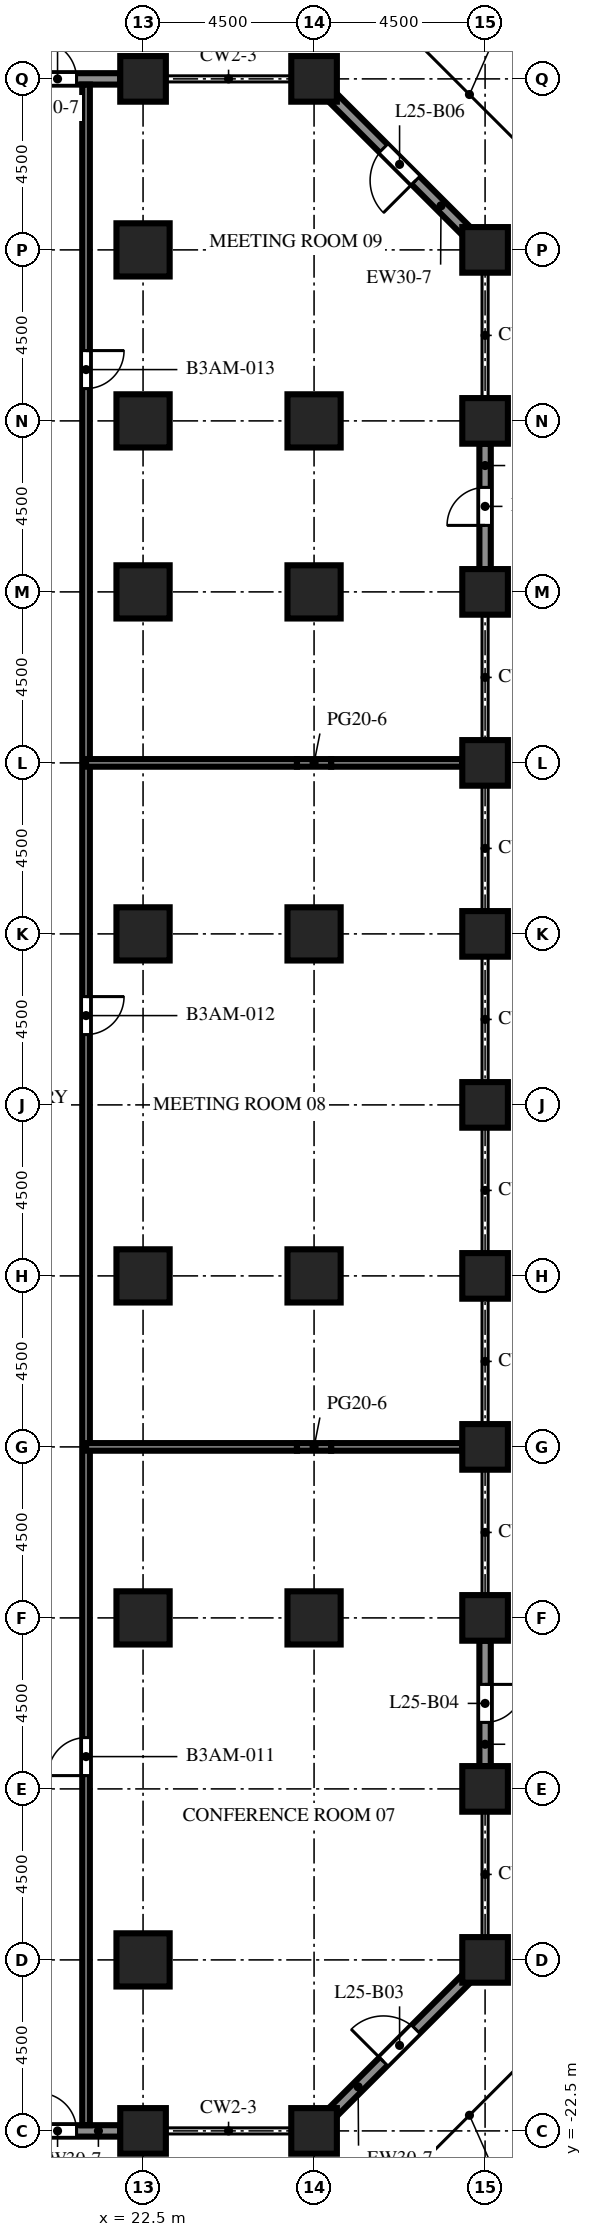
"""IFC4 building model, lengths in metres.
Left out: names, types, materials, properties, quantities, classifications, styles, units other than length and angle.
Written with IfcOpenShell. Run it as: python <this file> out.ifc"""

import sys

from ifc_helpers import new_model, si_unit, direction, frame, frame_2d, origin, origin_2d, place, context, subcontext, project, spatial, rectangle, extrude, element, fill, save


model = new_model("IFC4")
c1 = context("Model", 3, precision=1e-05, world=origin(), true_north=direction((0.0, 1.0)))
c2 = subcontext(c1, "Body", "Model", "MODEL_VIEW")
j1 = project(units=[si_unit("LENGTHUNIT", "METRE"), si_unit("PLANEANGLEUNIT", "RADIAN")], contexts=[c1])
p1 = place(None, origin())
s1 = spatial("IfcSite", under=j1, at=p1, CompositionType="ELEMENT")
p2 = place(p1, origin())
s2 = spatial("IfcBuilding", under=s1, at=p2, CompositionType="ELEMENT")
p3 = place(p2, frame((0.0, 0.0, 110.7)))
s3 = spatial("IfcBuildingStorey", under=s2, at=p3, CompositionType="ELEMENT", Elevation=110.7)
for number, where, z_axis, x_axis in (
    (1, (22.5, -22.5, 0.0), (0.0, 0.0, 1.0), (1.0, 0.0, 0.0)),
    (2, (22.5, 31.5, 0.0), (0.0, 0.0, 1.0), (1.0, 0.0, 0.0)),
):
    element("IfcColumn", number, at=place(p3, frame(where, z_axis=z_axis, x_axis=x_axis)), inside=s3, PredefinedType="COLUMN", context=c2, shape_type="SweptSolid", body=[
        extrude(rectangle(XDim=1.2, YDim=1.2, at=origin_2d()), origin(), (0.0, 0.0, 1.0), 6.0),
    ])
for number, where, z_axis, x_axis in (
    (3, (27.0, -22.5, 0.0), (0.0, 0.0, 1.0), (1.0, 0.0, 0.0)),
    (4, (27.0, 31.5, 0.0), (0.0, 0.0, 1.0), (1.0, 0.0, 0.0)),
):
    element("IfcColumn", number, at=place(p3, frame(where, z_axis=z_axis, x_axis=x_axis)), inside=s3, PredefinedType="COLUMN", context=c2, shape_type="SweptSolid", body=[
        extrude(rectangle(XDim=1.2, YDim=1.2, at=origin_2d()), origin(), (0.0, 0.0, 1.0), 3.75),
    ])
for number, where, z_axis, x_axis in (
    (5, (31.5, -18.0, 0.0), (0.0, 0.0, 1.0), (1.0, 0.0, 0.0)),
    (6, (31.5, -13.5, 0.0), (0.0, 0.0, 1.0), (1.0, 0.0, 0.0)),
    (7, (31.5, -9.0, 0.0), (0.0, 0.0, 1.0), (1.0, 0.0, 0.0)),
    (8, (31.5, -4.5, 0.0), (0.0, 0.0, 1.0), (1.0, 0.0, 0.0)),
    (9, (31.5, 0.0, 0.0), (0.0, 0.0, 1.0), (1.0, 0.0, 0.0)),
    (10, (31.5, 4.5, 0.0), (0.0, 0.0, 1.0), (1.0, 0.0, 0.0)),
    (11, (31.5, 9.0, 0.0), (0.0, 0.0, 1.0), (1.0, 0.0, 0.0)),
    (12, (31.5, 13.5, 0.0), (0.0, 0.0, 1.0), (1.0, 0.0, 0.0)),
    (13, (31.5, 18.0, 0.0), (0.0, 0.0, 1.0), (1.0, 0.0, 0.0)),
    (14, (31.5, 22.5, 0.0), (0.0, 0.0, 1.0), (1.0, 0.0, 0.0)),
    (15, (31.5, 27.0, 0.0), (0.0, 0.0, 1.0), (1.0, 0.0, 0.0)),
):
    element("IfcColumn", number, at=place(p3, frame(where, z_axis=z_axis, x_axis=x_axis)), inside=s3, PredefinedType="COLUMN", context=c2, shape_type="SweptSolid", body=[
        extrude(rectangle(XDim=1.2, YDim=1.2, at=origin_2d()), origin(), (0.0, 0.0, 1.0), 6.0),
    ])
for number, where, z_axis, x_axis in (
    (16, (22.5, -18.0, 0.0), (0.0, 0.0, 1.0), (1.0, 0.0, 0.0)),
    (17, (22.5, -9.0, 0.0), (0.0, 0.0, 1.0), (1.0, 0.0, 0.0)),
    (18, (22.5, 0.0, 0.0), (0.0, 0.0, 1.0), (1.0, 0.0, 0.0)),
    (19, (22.5, 9.0, 0.0), (0.0, 0.0, 1.0), (1.0, 0.0, 0.0)),
    (20, (22.5, 18.0, 0.0), (0.0, 0.0, 1.0), (1.0, 0.0, 0.0)),
    (21, (22.5, 22.5, 0.0), (0.0, 0.0, 1.0), (1.0, 0.0, 0.0)),
    (22, (22.5, 27.0, 0.0), (0.0, 0.0, 1.0), (1.0, 0.0, 0.0)),
):
    element("IfcColumn", number, at=place(p3, frame(where, z_axis=z_axis, x_axis=x_axis)), inside=s3, PredefinedType="COLUMN", context=c2, shape_type="SweptSolid", body=[
        extrude(rectangle(XDim=1.4, YDim=1.4, at=origin_2d()), origin(), (0.0, 0.0, 1.0), 6.0),
    ])
for number, where, z_axis, x_axis in (
    (23, (27.0, -9.0, 0.0), (0.0, 0.0, 1.0), (1.0, 0.0, 0.0)),
    (24, (27.0, 0.0, 0.0), (0.0, 0.0, 1.0), (1.0, 0.0, 0.0)),
    (25, (27.0, 9.0, 0.0), (0.0, 0.0, 1.0), (1.0, 0.0, 0.0)),
    (26, (27.0, 18.0, 0.0), (0.0, 0.0, 1.0), (1.0, 0.0, 0.0)),
    (27, (27.0, 22.5, 0.0), (0.0, 0.0, 1.0), (1.0, 0.0, 0.0)),
):
    element("IfcColumn", number, at=place(p3, frame(where, z_axis=z_axis, x_axis=x_axis)), inside=s3, PredefinedType="COLUMN", context=c2, shape_type="SweptSolid", body=[
        extrude(rectangle(XDim=1.4, YDim=1.4, at=origin_2d()), origin(), (0.0, 0.0, 1.0), 5.55),
    ])
p4 = place(p3, frame((21.9, -22.5, 0.0), z_axis=(0.0, 0.0, 1.0), x_axis=(-1.0, 0.0, 0.0)))
e28 = element("IfcWall", 28, at=p4, inside=s3, PredefinedType="SOLIDWALL", context=c2, shape_type="SweptSolid", body=[
    extrude(rectangle(XDim=3.3, YDim=0.3, at=frame_2d((1.65, 0.0))), origin(), (0.0, 0.0, 1.0), 4.65),
])
p5 = place(p4, frame((1.15, 0.0, 0.0)))
e29 = element("IfcOpeningElement", 29, at=p5, cuts=e28, PredefinedType="OPENING", context=c2, shape_type="SweptSolid", body=[
    extrude(rectangle(XDim=1.0, YDim=2.2, at=frame_2d((0.5, 1.1))), frame((0.0, 0.16, 0.0), z_axis=(0.0, -1.0, 0.0), x_axis=(1.0, 0.0, 0.0)), (0.0, 0.0, 1.0), 0.32),
])
p6 = place(p3, frame((31.006, -18.494, 0.0), z_axis=(0.0, 0.0, 1.0), x_axis=(-0.707106781187, -0.707106781187, 0.0)))
e30 = element("IfcWall", 30, at=p6, inside=s3, PredefinedType="SOLIDWALL", context=c2, shape_type="SweptSolid", body=[
    extrude(rectangle(XDim=4.967, YDim=0.3, at=frame_2d((2.483, 0.0))), origin(), (0.0, 0.0, 1.0), 4.65),
])
p7 = place(p6, frame((1.884, 0.0, 0.0)))
e31 = element("IfcOpeningElement", 31, at=p7, cuts=e30, PredefinedType="OPENING", context=c2, shape_type="SweptSolid", body=[
    extrude(rectangle(XDim=1.2, YDim=2.2, at=frame_2d((0.6, 1.1))), frame((0.0, 0.16, 0.0), z_axis=(0.0, -1.0, 0.0), x_axis=(1.0, 0.0, 0.0)), (0.0, 0.0, 1.0), 0.32),
])
p8 = place(p3, frame((31.5, -9.6, 0.0), z_axis=(0.0, 0.0, 1.0), x_axis=(0.0, -1.0, 0.0)))
e32 = element("IfcWall", 32, at=p8, inside=s3, PredefinedType="SOLIDWALL", context=c2, shape_type="SweptSolid", body=[
    extrude(rectangle(XDim=3.3, YDim=0.3, at=frame_2d((1.65, 0.0))), origin(), (0.0, 0.0, 1.0), 4.65),
])
p9 = place(p8, frame((1.15, 0.0, 0.0)))
e33 = element("IfcOpeningElement", 33, at=p9, cuts=e32, PredefinedType="OPENING", context=c2, shape_type="SweptSolid", body=[
    extrude(rectangle(XDim=1.0, YDim=2.2, at=frame_2d((0.5, 1.1))), frame((0.0, 0.16, 0.0), z_axis=(0.0, -1.0, 0.0), x_axis=(1.0, 0.0, 0.0)), (0.0, 0.0, 1.0), 0.32),
])
p10 = place(p3, frame((31.5, 21.9, 0.0), z_axis=(0.0, 0.0, 1.0), x_axis=(0.0, -1.0, 0.0)))
e34 = element("IfcWall", 34, at=p10, inside=s3, PredefinedType="SOLIDWALL", context=c2, shape_type="SweptSolid", body=[
    extrude(rectangle(XDim=3.3, YDim=0.3, at=frame_2d((1.65, 0.0))), origin(), (0.0, 0.0, 1.0), 4.65),
])
p11 = place(p10, frame((1.15, 0.0, 0.0)))
e35 = element("IfcOpeningElement", 35, at=p11, cuts=e34, PredefinedType="OPENING", context=c2, shape_type="SweptSolid", body=[
    extrude(rectangle(XDim=1.0, YDim=2.2, at=frame_2d((0.5, 1.1))), frame((0.0, 0.16, 0.0), z_axis=(0.0, -1.0, 0.0), x_axis=(1.0, 0.0, 0.0)), (0.0, 0.0, 1.0), 0.32),
])
p12 = place(p3, frame((27.494, 31.006, 0.0), z_axis=(0.0, 0.0, 1.0), x_axis=(0.707106781187, -0.707106781187, 0.0)))
e36 = element("IfcWall", 36, at=p12, inside=s3, PredefinedType="SOLIDWALL", context=c2, shape_type="SweptSolid", body=[
    extrude(rectangle(XDim=4.967, YDim=0.3, at=frame_2d((2.483, 0.0))), origin(), (0.0, 0.0, 1.0), 4.65),
])
p13 = place(p12, frame((1.884, 0.0, 0.0)))
e37 = element("IfcOpeningElement", 37, at=p13, cuts=e36, PredefinedType="OPENING", context=c2, shape_type="SweptSolid", body=[
    extrude(rectangle(XDim=1.2, YDim=2.2, at=frame_2d((0.6, 1.1))), frame((0.0, 0.16, 0.0), z_axis=(0.0, -1.0, 0.0), x_axis=(1.0, 0.0, 0.0)), (0.0, 0.0, 1.0), 0.32),
])
p14 = place(p3, frame((18.6, 31.5, 0.0), z_axis=(0.0, 0.0, 1.0), x_axis=(1.0, 0.0, 0.0)))
e38 = element("IfcWall", 38, at=p14, inside=s3, PredefinedType="SOLIDWALL", context=c2, shape_type="SweptSolid", body=[
    extrude(rectangle(XDim=3.3, YDim=0.3, at=frame_2d((1.65, 0.0))), origin(), (0.0, 0.0, 1.0), 4.65),
])
p15 = place(p14, frame((1.15, 0.0, 0.0)))
e39 = element("IfcOpeningElement", 39, at=p15, cuts=e38, PredefinedType="OPENING", context=c2, shape_type="SweptSolid", body=[
    extrude(rectangle(XDim=1.0, YDim=2.2, at=frame_2d((0.5, 1.1))), frame((0.0, 0.16, 0.0), z_axis=(0.0, -1.0, 0.0), x_axis=(1.0, 0.0, 0.0)), (0.0, 0.0, 1.0), 0.32),
])
p16 = place(p3, frame((21.0, 31.35, 0.0), z_axis=(0.0, 0.0, 1.0), x_axis=(0.0, -1.0, 0.0)))
e40 = element("IfcWall", 40, at=p16, inside=s3, PredefinedType="PARTITIONING", context=c2, shape_type="SweptSolid", body=[
    extrude(rectangle(XDim=53.7, YDim=0.2, at=frame_2d((26.85, 0.0))), origin(), (0.0, 0.0, 1.0), 5.55),
])
p17 = place(p16, frame((43.5, 0.0, 0.0)))
e41 = element("IfcOpeningElement", 41, at=p17, cuts=e40, PredefinedType="OPENING", context=c2, shape_type="SweptSolid", body=[
    extrude(rectangle(XDim=1.0, YDim=2.1, at=frame_2d((0.5, 1.05))), frame((0.0, 0.11, 0.0), z_axis=(0.0, -1.0, 0.0), x_axis=(1.0, 0.0, 0.0)), (0.0, 0.0, 1.0), 0.22),
])
p18 = place(p16, frame((24.0, 0.0, 0.0)))
e42 = element("IfcOpeningElement", 42, at=p18, cuts=e40, PredefinedType="OPENING", context=c2, shape_type="SweptSolid", body=[
    extrude(rectangle(XDim=1.0, YDim=2.1, at=frame_2d((0.5, 1.05))), frame((0.0, 0.11, 0.0), z_axis=(0.0, -1.0, 0.0), x_axis=(1.0, 0.0, 0.0)), (0.0, 0.0, 1.0), 0.22),
])
p19 = place(p16, frame((7.0, 0.0, 0.0)))
e43 = element("IfcOpeningElement", 43, at=p19, cuts=e40, PredefinedType="OPENING", context=c2, shape_type="SweptSolid", body=[
    extrude(rectangle(XDim=1.0, YDim=2.1, at=frame_2d((0.5, 1.05))), frame((0.0, 0.11, 0.0), z_axis=(0.0, -1.0, 0.0), x_axis=(1.0, 0.0, 0.0)), (0.0, 0.0, 1.0), 0.22),
])
p20 = place(p3, frame((21.0, -4.5, 0.0), z_axis=(0.0, 0.0, 1.0), x_axis=(1.0, 0.0, 0.0)))
e44 = element("IfcWall", 44, at=p20, inside=s3, PredefinedType="PARTITIONING", context=c2, shape_type="SweptSolid", body=[
    extrude(rectangle(XDim=5.55, YDim=0.2, at=frame_2d((2.775, 0.0))), origin(), (0.0, 0.0, 1.0), 5.55),
])
p21 = place(p3, frame((26.55, -4.5, 0.0), z_axis=(0.0, 0.0, 1.0), x_axis=(1.0, 0.0, 0.0)))
e45 = element("IfcWall", 45, at=p21, inside=s3, PredefinedType="PARTITIONING", context=c2, shape_type="SweptSolid", body=[
    extrude(rectangle(XDim=0.9, YDim=0.2, at=frame_2d((0.45, 0.0))), origin(), (0.0, 0.0, 1.0), 3.72),
])
p22 = place(p3, frame((27.45, -4.5, 0.0), z_axis=(0.0, 0.0, 1.0), x_axis=(1.0, 0.0, 0.0)))
e46 = element("IfcWall", 46, at=p22, inside=s3, PredefinedType="PARTITIONING", context=c2, shape_type="SweptSolid", body=[
    extrude(rectangle(XDim=3.45, YDim=0.2, at=frame_2d((1.725, 0.0))), origin(), (0.0, 0.0, 1.0), 5.55),
])
p23 = place(p3, frame((21.0, 13.5, 0.0), z_axis=(0.0, 0.0, 1.0), x_axis=(1.0, 0.0, 0.0)))
e47 = element("IfcWall", 47, at=p23, inside=s3, PredefinedType="PARTITIONING", context=c2, shape_type="SweptSolid", body=[
    extrude(rectangle(XDim=5.55, YDim=0.2, at=frame_2d((2.775, 0.0))), origin(), (0.0, 0.0, 1.0), 5.55),
])
p24 = place(p3, frame((26.55, 13.5, 0.0), z_axis=(0.0, 0.0, 1.0), x_axis=(1.0, 0.0, 0.0)))
e48 = element("IfcWall", 48, at=p24, inside=s3, PredefinedType="PARTITIONING", context=c2, shape_type="SweptSolid", body=[
    extrude(rectangle(XDim=0.9, YDim=0.2, at=frame_2d((0.45, 0.0))), origin(), (0.0, 0.0, 1.0), 3.72),
])
p25 = place(p3, frame((27.45, 13.5, 0.0), z_axis=(0.0, 0.0, 1.0), x_axis=(1.0, 0.0, 0.0)))
e49 = element("IfcWall", 49, at=p25, inside=s3, PredefinedType="PARTITIONING", context=c2, shape_type="SweptSolid", body=[
    extrude(rectangle(XDim=3.45, YDim=0.2, at=frame_2d((1.725, 0.0))), origin(), (0.0, 0.0, 1.0), 5.55),
])
p26 = place(p5, origin())
e50 = element("IfcDoor", 50, at=p26, inside=s3, OperationType="SINGLE_SWING_RIGHT", PredefinedType="DOOR", context=c2, shape_type="SweptSolid", body=[
    extrude(rectangle(XDim=1.0, YDim=2.2, at=frame_2d((0.5, 1.1))), frame((0.0, 0.025, 0.0), z_axis=(0.0, -1.0, 0.0), x_axis=(1.0, 0.0, 0.0)), (0.0, 0.0, 1.0), 0.05),
])
fill(e29, e50)
p27 = place(p7, origin())
e51 = element("IfcDoor", 51, at=p27, inside=s3, OperationType="SINGLE_SWING_RIGHT", PredefinedType="DOOR", context=c2, shape_type="SweptSolid", body=[
    extrude(rectangle(XDim=1.2, YDim=2.2, at=frame_2d((0.6, 1.1))), frame((0.0, 0.025, 0.0), z_axis=(0.0, -1.0, 0.0), x_axis=(1.0, 0.0, 0.0)), (0.0, 0.0, 1.0), 0.05),
])
fill(e31, e51)
p28 = place(p9, origin())
e52 = element("IfcDoor", 52, at=p28, inside=s3, OperationType="SINGLE_SWING_LEFT", PredefinedType="DOOR", context=c2, shape_type="SweptSolid", body=[
    extrude(rectangle(XDim=1.0, YDim=2.2, at=frame_2d((0.5, 1.1))), frame((0.0, 0.025, 0.0), z_axis=(0.0, -1.0, 0.0), x_axis=(1.0, 0.0, 0.0)), (0.0, 0.0, 1.0), 0.05),
])
fill(e33, e52)
p29 = place(p11, origin())
e53 = element("IfcDoor", 53, at=p29, inside=s3, OperationType="SINGLE_SWING_RIGHT", PredefinedType="DOOR", context=c2, shape_type="SweptSolid", body=[
    extrude(rectangle(XDim=1.0, YDim=2.2, at=frame_2d((0.5, 1.1))), frame((0.0, 0.025, 0.0), z_axis=(0.0, -1.0, 0.0), x_axis=(1.0, 0.0, 0.0)), (0.0, 0.0, 1.0), 0.05),
])
fill(e35, e53)
p30 = place(p13, origin())
e54 = element("IfcDoor", 54, at=p30, inside=s3, OperationType="SINGLE_SWING_RIGHT", PredefinedType="DOOR", context=c2, shape_type="SweptSolid", body=[
    extrude(rectangle(XDim=1.2, YDim=2.2, at=frame_2d((0.6, 1.1))), frame((0.0, 0.025, 0.0), z_axis=(0.0, -1.0, 0.0), x_axis=(1.0, 0.0, 0.0)), (0.0, 0.0, 1.0), 0.05),
])
fill(e37, e54)
p31 = place(p15, origin())
e55 = element("IfcDoor", 55, at=p31, inside=s3, OperationType="SINGLE_SWING_LEFT", PredefinedType="DOOR", context=c2, shape_type="SweptSolid", body=[
    extrude(rectangle(XDim=1.0, YDim=2.2, at=frame_2d((0.5, 1.1))), frame((0.0, 0.025, 0.0), z_axis=(0.0, -1.0, 0.0), x_axis=(1.0, 0.0, 0.0)), (0.0, 0.0, 1.0), 0.05),
])
fill(e39, e55)
p32 = place(p17, origin())
e56 = element("IfcDoor", 56, at=p32, inside=s3, OperationType="SINGLE_SWING_RIGHT", PredefinedType="DOOR", context=c2, shape_type="SweptSolid", body=[
    extrude(rectangle(XDim=1.0, YDim=2.1, at=frame_2d((0.5, 1.05))), frame((0.0, 0.025, 0.0), z_axis=(0.0, -1.0, 0.0), x_axis=(1.0, 0.0, 0.0)), (0.0, 0.0, 1.0), 0.05),
])
fill(e41, e56)
p33 = place(p18, origin())
e57 = element("IfcDoor", 57, at=p33, inside=s3, OperationType="SINGLE_SWING_LEFT", PredefinedType="DOOR", context=c2, shape_type="SweptSolid", body=[
    extrude(rectangle(XDim=1.0, YDim=2.1, at=frame_2d((0.5, 1.05))), frame((0.0, 0.025, 0.0), z_axis=(0.0, -1.0, 0.0), x_axis=(1.0, 0.0, 0.0)), (0.0, 0.0, 1.0), 0.05),
])
fill(e42, e57)
p34 = place(p19, origin())
e58 = element("IfcDoor", 58, at=p34, inside=s3, OperationType="SINGLE_SWING_LEFT", PredefinedType="DOOR", context=c2, shape_type="SweptSolid", body=[
    extrude(rectangle(XDim=1.0, YDim=2.1, at=frame_2d((0.5, 1.05))), frame((0.0, 0.025, 0.0), z_axis=(0.0, -1.0, 0.0), x_axis=(1.0, 0.0, 0.0)), (0.0, 0.0, 1.0), 0.05),
])
fill(e43, e58)
save(model, sys.argv[1])
